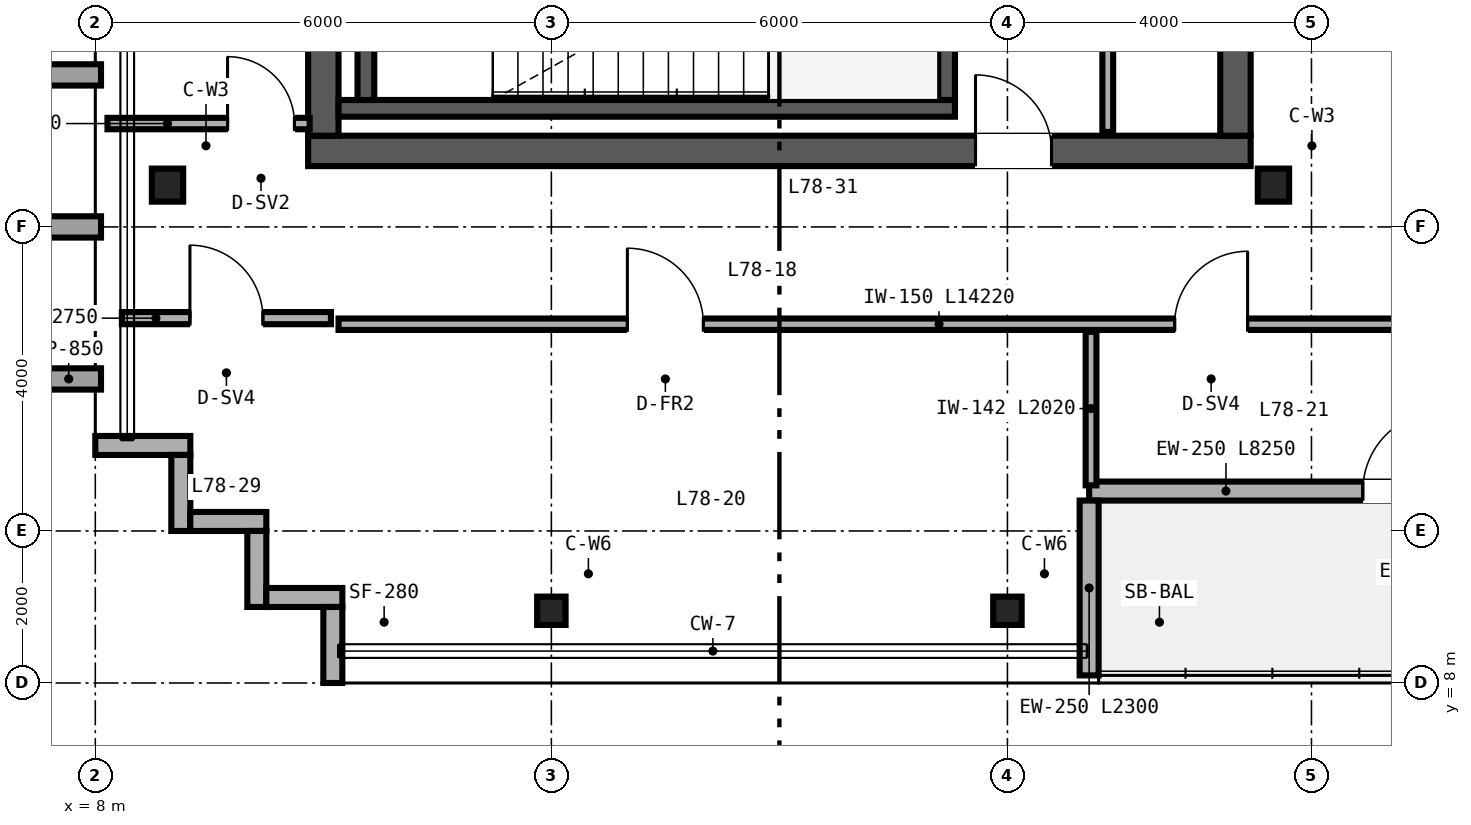
"""IFC4 building model, lengths in metres.
Left out: names, types, materials, properties, quantities, classifications, styles, units other than length and angle.
Written with IfcOpenShell. Run it as: python <this file> out.ifc"""

import sys

from ifc_helpers import new_model, si_unit, direction, frame, frame_2d, origin, origin_2d, place, context, subcontext, project, spatial, rectangle, i_section, extrude, source, transform, mapped, element, fill, save


model = new_model("IFC4")
c1 = context("Model", 3, precision=1e-05, world=origin(), true_north=direction((0.0, 1.0)))
c2 = subcontext(c1, "Body", "Model", "MODEL_VIEW")
j1 = project(units=[si_unit("LENGTHUNIT", "METRE"), si_unit("PLANEANGLEUNIT", "RADIAN")], contexts=[c1])
p1 = place(None, origin())
s1 = spatial("IfcSite", under=j1, at=p1, CompositionType="ELEMENT")
p2 = place(p1, origin())
s2 = spatial("IfcBuilding", under=s1, at=p2, CompositionType="ELEMENT")
p3 = place(p2, frame((0.0, 0.0, 305.4)))
s3 = spatial("IfcBuildingStorey", under=s2, at=p3, CompositionType="ELEMENT", Elevation=305.4)
p4 = place(p3, frame((10.8, 15.0, 0.0), z_axis=(0.0, 0.0, 1.0), x_axis=(1.0, 0.0, 0.0)))
e1 = element("IfcWall", 1, at=p4, inside=s3, PredefinedType="SHEAR", context=c2, shape_type="SweptSolid", body=[
    extrude(rectangle(XDim=12.4, YDim=0.4, at=frame_2d((6.2, 0.0))), origin(), (0.0, 0.0, 1.0), 3.88),
])
p5 = place(p4, frame((8.78, 0.0, 0.0)))
e2 = element("IfcOpeningElement", 2, at=p5, cuts=e1, PredefinedType="OPENING", context=c2, shape_type="SweptSolid", body=[
    extrude(rectangle(XDim=1.0, YDim=2.15, at=frame_2d((0.5, 1.075))), frame((0.0, 0.21, 0.0), z_axis=(0.0, -1.0, 0.0), x_axis=(1.0, 0.0, 0.0)), (0.0, 0.0, 1.0), 0.42),
])
for number, where, z_axis, x_axis in (
    (3, (11.0, 15.2, 0.0), (0.0, 0.0, 1.0), (0.0, 1.0, 0.0)),
    (4, (23.0, 15.2, 0.0), (0.0, 0.0, 1.0), (0.0, 1.0, 0.0)),
):
    element("IfcWall", number, at=place(p3, frame(where, z_axis=z_axis, x_axis=x_axis)), inside=s3, PredefinedType="SHEAR", context=c2, shape_type="SweptSolid", body=[
        extrude(rectangle(XDim=21.6, YDim=0.4, at=frame_2d((10.8, 0.0))), origin(), (0.0, 0.0, 1.0), 3.88),
    ])
p6 = place(p3, frame((11.2, 15.56, 0.0), z_axis=(0.0, 0.0, 1.0), x_axis=(1.0, 0.0, 0.0)))
e5 = element("IfcWall", 5, at=p6, inside=s3, PredefinedType="SHEAR", context=c2, shape_type="SweptSolid", body=[
    extrude(rectangle(XDim=8.11, YDim=0.22, at=frame_2d((4.055, 0.0))), origin(), (0.0, 0.0, 1.0), 4.0),
])
for number, where, z_axis, x_axis in (
    (6, (11.56, 15.67, 0.0), (0.0, 0.0, 1.0), (0.0, 1.0, 0.0)),
    (7, (19.2, 15.67, 0.0), (0.0, 0.0, 1.0), (0.0, 1.0, 0.0)),
):
    element("IfcWall", number, at=place(p3, frame(where, z_axis=z_axis, x_axis=x_axis)), inside=s3, PredefinedType="SHEAR", context=c2, shape_type="SweptSolid", body=[
        extrude(rectangle(XDim=3.28, YDim=0.22, at=frame_2d((1.64, 0.0))), origin(), (0.0, 0.0, 1.0), 4.0),
    ])
m1 = source(origin(), c2, "Body", "SweptSolid", [
    extrude(i_section(OverallWidth=0.412, OverallDepth=0.435, WebThickness=0.036, FlangeThickness=0.057, FilletRadius=0.025, at=origin_2d()), origin(), (0.0, 0.0, 1.0), 3.88),
])
for number, where, z_axis, x_axis in (
    (8, (8.95, 14.55, 0.0), (0.0, 0.0, 1.0), (1.0, 0.0, 0.0)),
    (9, (23.5, 14.55, 0.0), (0.0, 0.0, 1.0), (1.0, 0.0, 0.0)),
):
    element("IfcColumn", number, at=place(p3, frame(where, z_axis=z_axis, x_axis=x_axis)), inside=s3, PredefinedType="COLUMN", context=c2, shape_type="MappedRepresentation", body=[
        mapped(m1, transform((0.0, 0.0, 0.0), scale=1.0)),
    ])
m2 = source(origin(), c2, "Body", "SweptSolid", [
    extrude(i_section(OverallWidth=0.374, OverallDepth=0.373, WebThickness=0.016, FlangeThickness=0.026, FilletRadius=0.025, at=origin_2d()), origin(), (0.0, 0.0, 1.0), 3.88),
])
for number, where, z_axis, x_axis in (
    (10, (14.0, 8.95, 0.0), (0.0, 0.0, 1.0), (1.0, 0.0, 0.0)),
    (11, (20.0, 8.95, 0.0), (0.0, 0.0, 1.0), (1.0, 0.0, 0.0)),
):
    element("IfcColumn", number, at=place(p3, frame(where, z_axis=z_axis, x_axis=x_axis)), inside=s3, PredefinedType="COLUMN", context=c2, shape_type="MappedRepresentation", body=[
        mapped(m2, transform((0.0, 0.0, 0.0), scale=1.0)),
    ])
p7 = place(p3, frame((8.0, 11.125, 0.0), z_axis=(0.0, 0.0, 1.0), x_axis=(1.0, 0.0, 0.0)))
e12 = element("IfcWall", 12, at=p7, inside=s3, PredefinedType="SOLIDWALL", context=c2, shape_type="SweptSolid", body=[
    extrude(rectangle(XDim=1.25, YDim=0.25, at=frame_2d((0.625, 0.0))), origin(), (0.0, 0.0, 1.0), 3.88),
])
for number, where, z_axis, x_axis in (
    (13, (9.125, 11.0, 0.0), (0.0, 0.0, 1.0), (0.0, -1.0, 0.0)),
    (14, (9.25, 10.125, 0.0), (0.0, 0.0, 1.0), (1.0, 0.0, 0.0)),
    (15, (10.125, 10.0, 0.0), (0.0, 0.0, 1.0), (0.0, -1.0, 0.0)),
    (16, (10.25, 9.125, 0.0), (0.0, 0.0, 1.0), (1.0, 0.0, 0.0)),
    (17, (11.125, 9.0, 0.0), (0.0, 0.0, 1.0), (0.0, -1.0, 0.0)),
):
    element("IfcWall", number, at=place(p3, frame(where, z_axis=z_axis, x_axis=x_axis)), inside=s3, PredefinedType="SOLIDWALL", context=c2, shape_type="SweptSolid", body=[
        extrude(rectangle(XDim=1.0, YDim=0.25, at=frame_2d((0.5, 0.0))), origin(), (0.0, 0.0, 1.0), 3.88),
    ])
p8 = place(p3, frame((21.075, 10.525, 0.0), z_axis=(0.0, 0.0, 1.0), x_axis=(1.0, 0.0, 0.0)))
e18 = element("IfcWall", 18, at=p8, inside=s3, PredefinedType="SOLIDWALL", context=c2, shape_type="SweptSolid", body=[
    extrude(rectangle(XDim=8.25, YDim=0.25, at=frame_2d((4.125, 0.0))), origin(), (0.0, 0.0, 1.0), 3.88),
])
p9 = place(p8, frame((3.6, 0.0, 0.0)))
e19 = element("IfcOpeningElement", 19, at=p9, cuts=e18, PredefinedType="OPENING", context=c2, shape_type="SweptSolid", body=[
    extrude(rectangle(XDim=1.05, YDim=2.15, at=frame_2d((0.525, 1.075))), frame((0.0, 0.135, 0.0), z_axis=(0.0, -1.0, 0.0), x_axis=(1.0, 0.0, 0.0)), (0.0, 0.0, 1.0), 0.27),
])
p10 = place(p3, frame((21.075, 8.1, 0.0), z_axis=(0.0, 0.0, 1.0), x_axis=(0.0, 1.0, 0.0)))
e20 = element("IfcWall", 20, at=p10, inside=s3, PredefinedType="SOLIDWALL", context=c2, shape_type="SweptSolid", body=[
    extrude(rectangle(XDim=2.3, YDim=0.25, at=frame_2d((1.15, 0.0))), origin(), (0.0, 0.0, 1.0), 3.88),
])
p11 = place(p3, frame((21.32, 15.25, 0.0), z_axis=(0.0, 0.0, 1.0), x_axis=(0.0, 1.0, 0.0)))
e21 = element("IfcWall", 21, at=p11, inside=s3, PredefinedType="PARTITIONING", context=c2, shape_type="SweptSolid", body=[
    extrude(rectangle(XDim=3.59, YDim=0.142, at=frame_2d((1.795, 0.0))), origin(), (0.0, 0.0, 1.0), 3.88),
])
p12 = place(p11, frame((1.25, 0.0, 0.0)))
e22 = element("IfcOpeningElement", 22, at=p12, cuts=e21, PredefinedType="OPENING", context=c2, shape_type="SweptSolid", body=[
    extrude(rectangle(XDim=0.84, YDim=2.1, at=frame_2d((0.42, 1.05))), frame((0.0, 0.081, 0.0), z_axis=(0.0, -1.0, 0.0), x_axis=(1.0, 0.0, 0.0)), (0.0, 0.0, 1.0), 0.162),
])
p13 = place(p3, frame((11.2, 12.72, 0.0), z_axis=(0.0, 0.0, 1.0), x_axis=(1.0, 0.0, 0.0)))
e23 = element("IfcWall", 23, at=p13, inside=s3, PredefinedType="PARTITIONING", context=c2, shape_type="SweptSolid", body=[
    extrude(rectangle(XDim=14.22, YDim=0.15, at=frame_2d((7.11, 0.0))), origin(), (0.0, 0.0, 1.0), 3.88),
])
p14 = place(p13, frame((3.8, 0.0, 0.0)))
e24 = element("IfcOpeningElement", 24, at=p14, cuts=e23, PredefinedType="OPENING", context=c2, shape_type="SweptSolid", body=[
    extrude(rectangle(XDim=1.0, YDim=2.15, at=frame_2d((0.5, 1.075))), frame((0.0, 0.085, 0.0), z_axis=(0.0, -1.0, 0.0), x_axis=(1.0, 0.0, 0.0)), (0.0, 0.0, 1.0), 0.17),
])
p15 = place(p13, frame((11.0, 0.0, 0.0)))
e25 = element("IfcOpeningElement", 25, at=p15, cuts=e23, PredefinedType="OPENING", context=c2, shape_type="SweptSolid", body=[
    extrude(rectangle(XDim=0.96, YDim=2.15, at=frame_2d((0.48, 1.075))), frame((0.0, 0.085, 0.0), z_axis=(0.0, -1.0, 0.0), x_axis=(1.0, 0.0, 0.0)), (0.0, 0.0, 1.0), 0.17),
])
p16 = place(p3, frame((21.1, 10.6, 0.0), z_axis=(0.0, 0.0, 1.0), x_axis=(0.0, 1.0, 0.0)))
e26 = element("IfcWall", 26, at=p16, inside=s3, PredefinedType="PARTITIONING", context=c2, shape_type="SweptSolid", body=[
    extrude(rectangle(XDim=2.02, YDim=0.142, at=frame_2d((1.01, 0.0))), origin(), (0.0, 0.0, 1.0), 3.88),
])
p17 = place(p3, frame((8.16, 15.36, 0.0), z_axis=(0.0, 0.0, 1.0), x_axis=(1.0, 0.0, 0.0)))
e27 = element("IfcWall", 27, at=p17, inside=s3, PredefinedType="PARTITIONING", context=c2, shape_type="SweptSolid", body=[
    extrude(rectangle(XDim=2.66, YDim=0.15, at=frame_2d((1.33, 0.0))), origin(), (0.0, 0.0, 1.0), 3.101),
])
p18 = place(p17, frame((1.58, 0.0, 0.0)))
e28 = element("IfcOpeningElement", 28, at=p18, cuts=e27, PredefinedType="OPENING", context=c2, shape_type="SweptSolid", body=[
    extrude(rectangle(XDim=0.88, YDim=2.15, at=frame_2d((0.44, 1.075))), frame((0.0, 0.085, 0.0), z_axis=(0.0, -1.0, 0.0), x_axis=(1.0, 0.0, 0.0)), (0.0, 0.0, 1.0), 0.17),
])
p19 = place(p3, frame((8.35, 12.8, 0.0), z_axis=(0.0, 0.0, 1.0), x_axis=(1.0, 0.0, 0.0)))
e29 = element("IfcWall", 29, at=p19, inside=s3, PredefinedType="PARTITIONING", context=c2, shape_type="SweptSolid", body=[
    extrude(rectangle(XDim=2.75, YDim=0.16, at=frame_2d((1.375, 0.0))), origin(), (0.0, 0.0, 1.0), 3.88),
])
p20 = place(p19, frame((0.895, 0.0, 0.0)))
e30 = element("IfcOpeningElement", 30, at=p20, cuts=e29, PredefinedType="OPENING", context=c2, shape_type="SweptSolid", body=[
    extrude(rectangle(XDim=0.96, YDim=2.15, at=frame_2d((0.48, 1.075))), frame((0.0, 0.09, 0.0), z_axis=(0.0, -1.0, 0.0), x_axis=(1.0, 0.0, 0.0)), (0.0, 0.0, 1.0), 0.18),
])
m3 = source(origin(), c2, "Body", "SweptSolid", [
    extrude(rectangle(XDim=1.05, YDim=2.15, at=frame_2d((0.525, 1.075))), frame((0.0, 0.025, 0.0), z_axis=(0.0, -1.0, 0.0), x_axis=(1.0, 0.0, 0.0)), (0.0, 0.0, 1.0), 0.05),
])
p21 = place(p9, origin())
e31 = element("IfcDoor", 31, at=p21, inside=s3, OperationType="SINGLE_SWING_RIGHT", PredefinedType="DOOR", context=c2, shape_type="MappedRepresentation", body=[
    mapped(m3, transform((0.0, 0.0, 0.0), scale=1.0)),
])
fill(e19, e31)
m4 = source(origin(), c2, "Body", "SweptSolid", [
    extrude(rectangle(XDim=1.0, YDim=2.15, at=frame_2d((0.5, 1.075))), frame((0.0, 0.025, 0.0), z_axis=(0.0, -1.0, 0.0), x_axis=(1.0, 0.0, 0.0)), (0.0, 0.0, 1.0), 0.05),
])
p22 = place(p5, origin())
e32 = element("IfcDoor", 32, at=p22, inside=s3, OperationType="SINGLE_SWING_LEFT", PredefinedType="DOOR", context=c2, shape_type="MappedRepresentation", body=[
    mapped(m4, transform((0.0, 0.0, 0.0), scale=1.0)),
])
fill(e2, e32)
p23 = place(p14, origin())
e33 = element("IfcDoor", 33, at=p23, inside=s3, OperationType="SINGLE_SWING_LEFT", PredefinedType="DOOR", context=c2, shape_type="MappedRepresentation", body=[
    mapped(m4, transform((0.0, 0.0, 0.0), scale=1.0)),
])
fill(e24, e33)
m5 = source(origin(), c2, "Body", "SweptSolid", [
    extrude(rectangle(XDim=0.96, YDim=2.15, at=frame_2d((0.48, 1.075))), frame((0.0, 0.025, 0.0), z_axis=(0.0, -1.0, 0.0), x_axis=(1.0, 0.0, 0.0)), (0.0, 0.0, 1.0), 0.05),
])
p24 = place(p15, origin())
e34 = element("IfcDoor", 34, at=p24, inside=s3, OperationType="SINGLE_SWING_RIGHT", PredefinedType="DOOR", context=c2, shape_type="MappedRepresentation", body=[
    mapped(m5, transform((0.0, 0.0, 0.0), scale=1.0)),
])
fill(e25, e34)
m6 = source(origin(), c2, "Body", "SweptSolid", [
    extrude(rectangle(XDim=0.88, YDim=2.15, at=frame_2d((0.44, 1.075))), frame((0.0, 0.025, 0.0), z_axis=(0.0, -1.0, 0.0), x_axis=(1.0, 0.0, 0.0)), (0.0, 0.0, 1.0), 0.05),
])
p25 = place(p18, origin())
e35 = element("IfcDoor", 35, at=p25, inside=s3, OperationType="SINGLE_SWING_LEFT", PredefinedType="DOOR", context=c2, shape_type="MappedRepresentation", body=[
    mapped(m6, transform((0.0, 0.0, 0.0), scale=1.0)),
])
fill(e28, e35)
p26 = place(p20, origin())
e36 = element("IfcDoor", 36, at=p26, inside=s3, OperationType="SINGLE_SWING_LEFT", PredefinedType="DOOR", context=c2, shape_type="MappedRepresentation", body=[
    mapped(m5, transform((0.0, 0.0, 0.0), scale=1.0)),
])
fill(e30, e36)
save(model, sys.argv[1])
